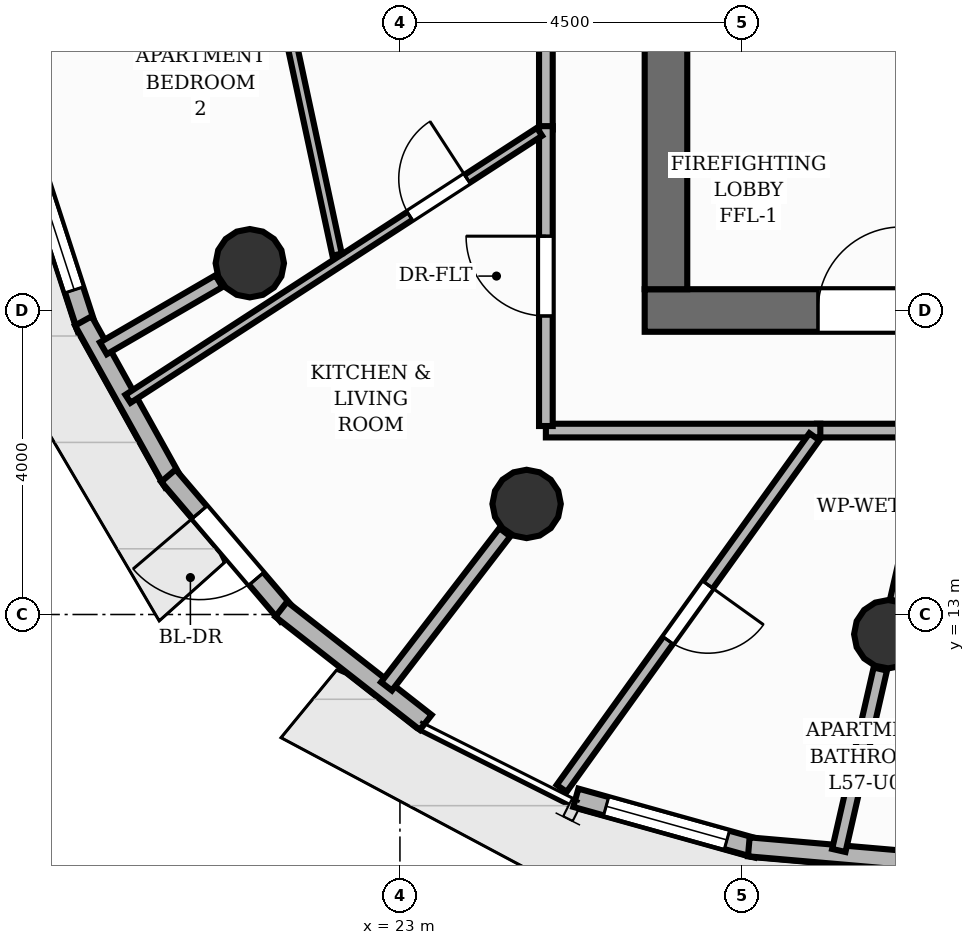
"""IFC4 building model, lengths in metres.
Left out: names, types, materials, properties, quantities, classifications, styles, units other than length and angle.
Written with IfcOpenShell. Run it as: python <this file> out.ifc"""

import sys

from ifc_helpers import new_model, si_unit, direction, frame, frame_2d, origin, origin_2d, place, context, subcontext, project, spatial, rectangle, circle, extrude, element, fill, save


model = new_model("IFC4")
c1 = context("Model", 3, precision=1e-05, world=origin(), true_north=direction((0.0, 1.0)))
c2 = subcontext(c1, "Body", "Model", "MODEL_VIEW")
j1 = project(units=[si_unit("LENGTHUNIT", "METRE"), si_unit("PLANEANGLEUNIT", "RADIAN")], contexts=[c1])
p1 = place(None, origin())
s1 = spatial("IfcSite", under=j1, at=p1, CompositionType="ELEMENT")
p2 = place(p1, origin())
s2 = spatial("IfcBuilding", under=s1, at=p2, CompositionType="ELEMENT")
p3 = place(p2, frame((0.0, 0.0, 191.84)))
s3 = spatial("IfcBuildingStorey", under=s2, at=p3, CompositionType="ELEMENT", Elevation=191.84)
p4 = place(p3, frame((26.22, 17.0, 0.0), z_axis=(0.0, 0.0, 1.0), x_axis=(1.0, 0.0, 0.0)))
e1 = element("IfcWall", 1, at=p4, inside=s3, PredefinedType="SHEAR", context=c2, shape_type="SweptSolid", body=[
    extrude(rectangle(XDim=11.56, YDim=0.56, at=frame_2d((5.78, 0.0))), origin(), (0.0, 0.0, 1.0), 3.2),
])
p5 = place(p4, frame((2.28, 0.0, 0.0)))
e2 = element("IfcOpeningElement", 2, at=p5, cuts=e1, PredefinedType="OPENING", context=c2, shape_type="SweptSolid", body=[
    extrude(rectangle(XDim=1.1, YDim=2.15, at=frame_2d((0.55, 1.075))), frame((0.0, 0.29, 0.0), z_axis=(0.0, -1.0, 0.0), x_axis=(1.0, 0.0, 0.0)), (0.0, 0.0, 1.0), 0.58),
])
p6 = place(p4, frame((5.83, 0.0, 0.0)))
e3 = element("IfcOpeningElement", 3, at=p6, cuts=e1, PredefinedType="OPENING", context=c2, shape_type="SweptSolid", body=[
    extrude(rectangle(XDim=0.9, YDim=2.1, at=frame_2d((0.45, 1.05))), frame((0.0, 0.29, 0.0), z_axis=(0.0, -1.0, 0.0), x_axis=(1.0, 0.0, 0.0)), (0.0, 0.0, 1.0), 0.58),
])
p7 = place(p3, frame((26.5, 17.28, 0.0), z_axis=(0.0, 0.0, 1.0), x_axis=(0.0, 1.0, 0.0)))
e4 = element("IfcWall", 4, at=p7, inside=s3, PredefinedType="SHEAR", context=c2, shape_type="SweptSolid", body=[
    extrude(rectangle(XDim=13.44, YDim=0.56, at=frame_2d((6.72, 0.0))), origin(), (0.0, 0.0, 1.0), 3.2),
])
for number, where, z_axis, x_axis in (
    (5, (21.025, 17.622, 0.0), (0.0, 0.0, 1.0), (1.0, 0.0, 0.0)),
    (6, (24.667, 14.455, 0.0), (0.0, 0.0, 1.0), (1.0, 0.0, 0.0)),
    (7, (29.425, 12.74, 0.0), (0.0, 0.0, 1.0), (1.0, 0.0, 0.0)),
):
    element("IfcColumn", number, at=place(p3, frame(where, z_axis=z_axis, x_axis=x_axis)), inside=s3, PredefinedType="COLUMN", context=c2, shape_type="SweptSolid", body=[
        extrude(circle(Radius=0.45, at=origin_2d()), origin(), (0.0, 0.0, 1.0), 3.2),
    ])
p8 = place(p3, frame((18.881, 16.759, 0.0), z_axis=(0.0, 0.0, 1.0), x_axis=(-0.309005861828, 0.951060133407, 0.0)))
e8 = element("IfcWall", 8, at=p8, inside=s3, PredefinedType="SOLIDWALL", context=c2, shape_type="SweptSolid", body=[
    extrude(rectangle(XDim=2.478, YDim=0.25, at=frame_2d((1.239, 0.0))), origin(), (0.0, 0.0, 1.0), 2.96),
])
p9 = place(p8, frame((0.539, 0.0, 0.85)))
e9 = element("IfcOpeningElement", 9, at=p9, cuts=e8, PredefinedType="OPENING", context=c2, shape_type="SweptSolid", body=[
    extrude(rectangle(XDim=1.4, YDim=1.55, at=frame_2d((0.7, 0.775))), frame((0.0, 0.135, 0.0), z_axis=(0.0, -1.0, 0.0), x_axis=(1.0, 0.0, 0.0)), (0.0, 0.0, 1.0), 0.27),
])
p10 = place(p3, frame((20.019, 14.733, 0.0), z_axis=(0.0, 0.0, 1.0), x_axis=(-0.485821561791, 0.874058013005, 0.0)))
e10 = element("IfcWall", 10, at=p10, inside=s3, PredefinedType="SOLIDWALL", context=c2, shape_type="SweptSolid", body=[
    extrude(rectangle(XDim=2.437, YDim=0.25, at=frame_2d((1.218, 0.0))), origin(), (0.0, 0.0, 1.0), 2.96),
])
p11 = place(p3, frame((21.521, 12.99, 0.0), z_axis=(0.0, 0.0, 1.0), x_axis=(-0.648874307696, 0.760895612297, 0.0)))
e11 = element("IfcWall", 11, at=p11, inside=s3, PredefinedType="SOLIDWALL", context=c2, shape_type="SweptSolid", body=[
    extrude(rectangle(XDim=2.415, YDim=0.25, at=frame_2d((1.208, 0.0))), origin(), (0.0, 0.0, 1.0), 2.96),
])
p12 = place(p11, frame((0.632, 0.0, 0.0)))
e12 = element("IfcOpeningElement", 12, at=p12, cuts=e11, PredefinedType="OPENING", context=c2, shape_type="SweptSolid", body=[
    extrude(rectangle(XDim=1.15, YDim=2.2, at=frame_2d((0.575, 1.1))), frame((0.0, 0.135, 0.0), z_axis=(0.0, -1.0, 0.0), x_axis=(1.0, 0.0, 0.0)), (0.0, 0.0, 1.0), 0.27),
])
p13 = place(p3, frame((23.339, 11.58, 0.0), z_axis=(0.0, 0.0, 1.0), x_axis=(-0.787404715416, 0.616436382883, 0.0)))
e13 = element("IfcWall", 13, at=p13, inside=s3, PredefinedType="SOLIDWALL", context=c2, shape_type="SweptSolid", body=[
    extrude(rectangle(XDim=2.415, YDim=0.25, at=frame_2d((1.208, 0.0))), origin(), (0.0, 0.0, 1.0), 2.96),
])
p14 = place(p3, frame((27.701, 9.923, 0.0), z_axis=(0.0, 0.0, 1.0), x_axis=(-0.96316841201, 0.26889888454, 0.0)))
e14 = element("IfcWall", 14, at=p14, inside=s3, PredefinedType="SOLIDWALL", context=c2, shape_type="SweptSolid", body=[
    extrude(rectangle(XDim=2.478, YDim=0.25, at=frame_2d((1.239, 0.0))), origin(), (0.0, 0.0, 1.0), 2.96),
])
p15 = place(p14, frame((0.414, 0.0, 0.85)))
e15 = element("IfcOpeningElement", 15, at=p15, cuts=e14, PredefinedType="OPENING", context=c2, shape_type="SweptSolid", body=[
    extrude(rectangle(XDim=1.65, YDim=1.55, at=frame_2d((0.825, 0.775))), frame((0.0, 0.135, 0.0), z_axis=(0.0, -1.0, 0.0), x_axis=(1.0, 0.0, 0.0)), (0.0, 0.0, 1.0), 0.27),
])
p16 = place(p3, frame((30.112, 9.724, 0.0), z_axis=(0.0, 0.0, 1.0), x_axis=(-0.996260822813, 0.08639660252, 0.0)))
e16 = element("IfcWall", 16, at=p16, inside=s3, PredefinedType="SOLIDWALL", context=c2, shape_type="SweptSolid", body=[
    extrude(rectangle(XDim=2.532, YDim=0.25, at=frame_2d((1.266, 0.0))), origin(), (0.0, 0.0, 1.0), 2.96),
])
p17 = place(p3, frame((20.618, 17.386, 0.0), z_axis=(0.0, 0.0, 1.0), x_axis=(-0.86461381872, -0.502437005482, 0.0)))
e17 = element("IfcWall", 17, at=p17, inside=s3, PredefinedType="PARTITIONING", context=c2, shape_type="SweptSolid", body=[
    extrude(rectangle(XDim=1.758, YDim=0.18, at=frame_2d((0.879, 0.0))), origin(), (0.0, 0.0, 1.0), 2.403),
])
p18 = place(p3, frame((24.38, 14.082, 0.0), z_axis=(0.0, 0.0, 1.0), x_axis=(-0.609249164273, -0.792978849549, 0.0)))
e18 = element("IfcWall", 18, at=p18, inside=s3, PredefinedType="PARTITIONING", context=c2, shape_type="SweptSolid", body=[
    extrude(rectangle(XDim=2.557, YDim=0.18, at=frame_2d((1.278, 0.0))), origin(), (0.0, 0.0, 1.0), 2.403),
])
p19 = place(p3, frame((29.32, 12.282, 0.0), z_axis=(0.0, 0.0, 1.0), x_axis=(-0.222943921747, -0.974831271429, 0.0)))
e19 = element("IfcWall", 19, at=p19, inside=s3, PredefinedType="PARTITIONING", context=c2, shape_type="SweptSolid", body=[
    extrude(rectangle(XDim=2.448, YDim=0.18, at=frame_2d((1.224, 0.0))), origin(), (0.0, 0.0, 1.0), 2.403),
])
p20 = place(p3, frame((39.08, 15.42, 0.0), z_axis=(0.0, 0.0, 1.0), x_axis=(-1.0, 0.0, 0.0)))
e20 = element("IfcWall", 20, at=p20, inside=s3, PredefinedType="PARTITIONING", context=c2, shape_type="SweptSolid", body=[
    extrude(rectangle(XDim=10.594, YDim=0.18, at=frame_2d((5.297, 0.0))), origin(), (0.0, 0.0, 1.0), 2.955),
])
p21 = place(p20, frame((3.021, 0.0, 0.0)))
e21 = element("IfcOpeningElement", 21, at=p21, cuts=e20, PredefinedType="OPENING", context=c2, shape_type="SweptSolid", body=[
    extrude(rectangle(XDim=0.9, YDim=2.1, at=frame_2d((0.45, 1.05))), frame((0.0, 0.1, 0.0), z_axis=(0.0, -1.0, 0.0), x_axis=(1.0, 0.0, 0.0)), (0.0, 0.0, 1.0), 0.2),
])
p22 = place(p20, frame((6.508, 0.0, 0.0)))
e22 = element("IfcOpeningElement", 22, at=p22, cuts=e20, PredefinedType="OPENING", context=c2, shape_type="SweptSolid", body=[
    extrude(rectangle(XDim=0.9, YDim=2.1, at=frame_2d((0.45, 1.05))), frame((0.0, 0.1, 0.0), z_axis=(0.0, -1.0, 0.0), x_axis=(1.0, 0.0, 0.0)), (0.0, 0.0, 1.0), 0.2),
])
p23 = place(p3, frame((24.92, 19.382, 0.0), z_axis=(0.0, 0.0, 1.0), x_axis=(0.0, 1.0, 0.0)))
e23 = element("IfcWall", 23, at=p23, inside=s3, PredefinedType="PARTITIONING", context=c2, shape_type="SweptSolid", body=[
    extrude(rectangle(XDim=13.198, YDim=0.18, at=frame_2d((6.599, 0.0))), origin(), (0.0, 0.0, 1.0), 2.955),
])
p24 = place(p23, frame((7.282, 0.0, 0.0)))
e24 = element("IfcOpeningElement", 24, at=p24, cuts=e23, PredefinedType="OPENING", context=c2, shape_type="SweptSolid", body=[
    extrude(rectangle(XDim=0.9, YDim=2.1, at=frame_2d((0.45, 1.05))), frame((0.0, 0.1, 0.0), z_axis=(0.0, -1.0, 0.0), x_axis=(1.0, 0.0, 0.0)), (0.0, 0.0, 1.0), 0.2),
])
p25 = place(p3, frame((28.531, 15.42, 0.0), z_axis=(0.0, 0.0, 1.0), x_axis=(-1.0, 0.0, 0.0)))
e25 = element("IfcWall", 25, at=p25, inside=s3, PredefinedType="PARTITIONING", context=c2, shape_type="SweptSolid", body=[
    extrude(rectangle(XDim=3.611, YDim=0.18, at=frame_2d((1.805, 0.0))), origin(), (0.0, 0.0, 1.0), 2.955),
])
p26 = place(p3, frame((24.92, 15.48, 0.0), z_axis=(0.0, 0.0, 1.0), x_axis=(0.0, 1.0, 0.0)))
e26 = element("IfcWall", 26, at=p26, inside=s3, PredefinedType="PARTITIONING", context=c2, shape_type="SweptSolid", body=[
    extrude(rectangle(XDim=3.946, YDim=0.18, at=frame_2d((1.973, 0.0))), origin(), (0.0, 0.0, 1.0), 2.955),
])
p27 = place(p26, frame((1.448, 0.0, 0.0)))
e27 = element("IfcOpeningElement", 27, at=p27, cuts=e26, PredefinedType="OPENING", context=c2, shape_type="SweptSolid", body=[
    extrude(rectangle(XDim=1.05, YDim=2.15, at=frame_2d((0.525, 1.075))), frame((0.0, 0.1, 0.0), z_axis=(0.0, -1.0, 0.0), x_axis=(1.0, 0.0, 0.0)), (0.0, 0.0, 1.0), 0.2),
])
p28 = place(p3, frame((29.525, 13.179, 0.0), z_axis=(0.0, 0.0, 1.0), x_axis=(0.222969522248, 0.974825416241, 0.0)))
e28 = element("IfcWall", 28, at=p28, inside=s3, PredefinedType="PLUMBINGWALL", context=c2, shape_type="SweptSolid", body=[
    extrude(rectangle(XDim=2.199, YDim=0.16, at=frame_2d((1.099, 0.0))), origin(), (0.0, 0.0, 1.0), 2.403),
])
p29 = place(p3, frame((28.452, 15.339, 0.0), z_axis=(0.0, 0.0, 1.0), x_axis=(-0.583489481732, -0.812120695899, 0.0)))
e29 = element("IfcWall", 29, at=p29, inside=s3, PredefinedType="PLUMBINGWALL", context=c2, shape_type="SweptSolid", body=[
    extrude(rectangle(XDim=5.698, YDim=0.16, at=frame_2d((2.849, 0.0))), origin(), (0.0, 0.0, 1.0), 2.692),
])
p30 = place(p29, frame((2.399, 0.0, 0.0)))
e30 = element("IfcOpeningElement", 30, at=p30, cuts=e29, PredefinedType="OPENING", context=c2, shape_type="SweptSolid", body=[
    extrude(rectangle(XDim=0.9, YDim=2.1, at=frame_2d((0.45, 1.05))), frame((0.0, 0.09, 0.0), z_axis=(0.0, -1.0, 0.0), x_axis=(1.0, 0.0, 0.0)), (0.0, 0.0, 1.0), 0.18),
])
p31 = place(p3, frame((19.422, 15.838, 0.0), z_axis=(0.0, 0.0, 1.0), x_axis=(0.838876327826, 0.544322061479, 0.0)))
e31 = element("IfcWall", 31, at=p31, inside=s3, PredefinedType="PARTITIONING", context=c2, shape_type="SweptSolid", body=[
    extrude(rectangle(XDim=6.454, YDim=0.125, at=frame_2d((3.227, 0.0))), origin(), (0.0, 0.0, 1.0), 2.955),
])
p32 = place(p31, frame((4.419, 0.0, 0.0)))
e32 = element("IfcOpeningElement", 32, at=p32, cuts=e31, PredefinedType="OPENING", context=c2, shape_type="SweptSolid", body=[
    extrude(rectangle(XDim=0.9, YDim=2.1, at=frame_2d((0.45, 1.05))), frame((0.0, 0.073, 0.0), z_axis=(0.0, -1.0, 0.0), x_axis=(1.0, 0.0, 0.0)), (0.0, 0.0, 1.0), 0.145),
])
p33 = place(p3, frame((22.173, 17.735, 0.0), z_axis=(0.0, 0.0, 1.0), x_axis=(-0.20987090056, 0.977729106194, 0.0)))
e33 = element("IfcWall", 33, at=p33, inside=s3, PredefinedType="PARTITIONING", context=c2, shape_type="SweptSolid", body=[
    extrude(rectangle(XDim=8.341, YDim=0.125, at=frame_2d((4.17, 0.0))), origin(), (0.0, 0.0, 1.0), 2.955),
])
p34 = place(p33, frame((3.72, 0.0, 0.0)))
e34 = element("IfcOpeningElement", 34, at=p34, cuts=e33, PredefinedType="OPENING", context=c2, shape_type="SweptSolid", body=[
    extrude(rectangle(XDim=0.9, YDim=2.1, at=frame_2d((0.45, 1.05))), frame((0.0, 0.073, 0.0), z_axis=(0.0, -1.0, 0.0), x_axis=(1.0, 0.0, 0.0)), (0.0, 0.0, 1.0), 0.145),
])
p35 = place(p12, origin())
e35 = element("IfcDoor", 35, at=p35, inside=s3, OperationType="SINGLE_SWING_RIGHT", PredefinedType="DOOR", context=c2, shape_type="SweptSolid", body=[
    extrude(rectangle(XDim=1.15, YDim=2.2, at=frame_2d((0.575, 1.1))), frame((0.0, 0.025, 0.0), z_axis=(0.0, -1.0, 0.0), x_axis=(1.0, 0.0, 0.0)), (0.0, 0.0, 1.0), 0.05),
])
fill(e12, e35)
p36 = place(p9, origin())
e36 = element("IfcWindow", 36, at=p36, inside=s3, PartitioningType="SINGLE_PANEL", PredefinedType="WINDOW", context=c2, shape_type="SweptSolid", body=[
    extrude(rectangle(XDim=1.4, YDim=1.55, at=frame_2d((0.7, 0.775))), frame((0.0, 0.03, 0.0), z_axis=(0.0, -1.0, 0.0), x_axis=(1.0, 0.0, 0.0)), (0.0, 0.0, 1.0), 0.06),
])
fill(e9, e36)
p37 = place(p15, origin())
e37 = element("IfcWindow", 37, at=p37, inside=s3, PartitioningType="SINGLE_PANEL", PredefinedType="WINDOW", context=c2, shape_type="SweptSolid", body=[
    extrude(rectangle(XDim=1.65, YDim=1.55, at=frame_2d((0.825, 0.775))), frame((0.0, 0.03, 0.0), z_axis=(0.0, -1.0, 0.0), x_axis=(1.0, 0.0, 0.0)), (0.0, 0.0, 1.0), 0.06),
])
fill(e15, e37)
p38 = place(p5, origin())
e38 = element("IfcDoor", 38, at=p38, inside=s3, OperationType="SINGLE_SWING_RIGHT", PredefinedType="DOOR", context=c2, shape_type="SweptSolid", body=[
    extrude(rectangle(XDim=1.1, YDim=2.15, at=frame_2d((0.55, 1.075))), frame((0.0, 0.025, 0.0), z_axis=(0.0, -1.0, 0.0), x_axis=(1.0, 0.0, 0.0)), (0.0, 0.0, 1.0), 0.05),
])
fill(e2, e38)
p39 = place(p27, origin())
e39 = element("IfcDoor", 39, at=p39, inside=s3, OperationType="SINGLE_SWING_RIGHT", PredefinedType="DOOR", context=c2, shape_type="SweptSolid", body=[
    extrude(rectangle(XDim=1.05, YDim=2.15, at=frame_2d((0.525, 1.075))), frame((0.0, 0.025, 0.0), z_axis=(0.0, -1.0, 0.0), x_axis=(1.0, 0.0, 0.0)), (0.0, 0.0, 1.0), 0.05),
])
fill(e27, e39)
p40 = place(p30, origin())
e40 = element("IfcDoor", 40, at=p40, inside=s3, OperationType="SINGLE_SWING_LEFT", PredefinedType="DOOR", context=c2, shape_type="SweptSolid", body=[
    extrude(rectangle(XDim=0.9, YDim=2.1, at=frame_2d((0.45, 1.05))), frame((0.0, 0.025, 0.0), z_axis=(0.0, -1.0, 0.0), x_axis=(1.0, 0.0, 0.0)), (0.0, 0.0, 1.0), 0.05),
])
fill(e30, e40)
p41 = place(p32, origin())
e41 = element("IfcDoor", 41, at=p41, inside=s3, OperationType="SINGLE_SWING_RIGHT", PredefinedType="DOOR", context=c2, shape_type="SweptSolid", body=[
    extrude(rectangle(XDim=0.9, YDim=2.1, at=frame_2d((0.45, 1.05))), frame((0.0, 0.025, 0.0), z_axis=(0.0, -1.0, 0.0), x_axis=(1.0, 0.0, 0.0)), (0.0, 0.0, 1.0), 0.05),
])
fill(e32, e41)
save(model, sys.argv[1])
